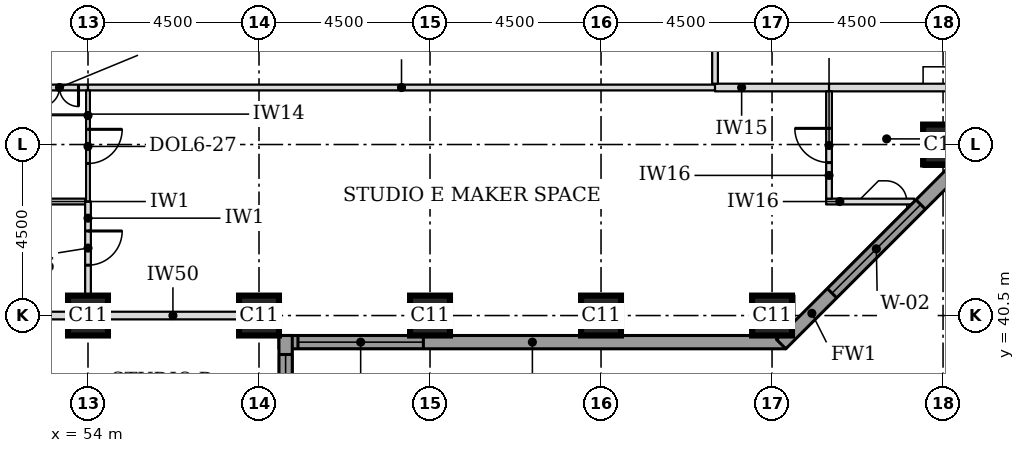
"""IFC4 building model, lengths in metres.
Left out: names, types, materials, properties, quantities, classifications, styles, units other than length and angle.
Written with IfcOpenShell. Run it as: python <this file> out.ifc"""

import sys

from ifc_helpers import new_model, si_unit, direction, frame, frame_2d, origin, origin_2d, place, context, subcontext, project, spatial, rectangle, extrude, element, fill, save


model = new_model("IFC4")
c1 = context("Model", 3, precision=1e-05, world=origin(), true_north=direction((0.0, 1.0)))
c2 = subcontext(c1, "Body", "Model", "MODEL_VIEW")
j1 = project(units=[si_unit("LENGTHUNIT", "METRE"), si_unit("PLANEANGLEUNIT", "RADIAN")], contexts=[c1])
p1 = place(None, origin())
s1 = spatial("IfcSite", under=j1, at=p1, CompositionType="ELEMENT")
p2 = place(p1, origin())
s2 = spatial("IfcBuilding", under=s1, at=p2, CompositionType="ELEMENT")
p3 = place(p2, frame((0.0, 0.0, 115.9)))
s3 = spatial("IfcBuildingStorey", under=s2, at=p3, CompositionType="ELEMENT", Elevation=115.9)
for number, where, z_axis, x_axis in (
    (1, (54.0, 40.5, 0.0), (0.0, 0.0, 1.0), (1.0, 0.0, 0.0)),
    (2, (58.5, 40.5, 0.0), (0.0, 0.0, 1.0), (1.0, 0.0, 0.0)),
    (3, (63.0, 40.5, 0.0), (0.0, 0.0, 1.0), (1.0, 0.0, 0.0)),
    (4, (67.5, 40.5, 0.0), (0.0, 0.0, 1.0), (1.0, 0.0, 0.0)),
    (5, (72.0, 40.5, 0.0), (0.0, 0.0, 1.0), (1.0, 0.0, 0.0)),
    (6, (76.5, 45.0, 0.0), (0.0, 0.0, 1.0), (1.0, 0.0, 0.0)),
):
    element("IfcColumn", number, at=place(p3, frame(where, z_axis=z_axis, x_axis=x_axis)), inside=s3, PredefinedType="COLUMN", context=c2, shape_type="SweptSolid", body=[
        extrude(rectangle(XDim=1.05, YDim=1.05, at=origin_2d()), origin(), (0.0, 0.0, 1.0), 3.7),
    ])
p4 = place(p3, frame((59.025, 39.8, 0.0), z_axis=(0.0, 0.0, 1.0), x_axis=(1.0, 0.0, 0.0)))
e7 = element("IfcWall", 7, at=p4, inside=s3, PredefinedType="STANDARD", context=c2, shape_type="SweptSolid", body=[
    extrude(rectangle(XDim=13.337, YDim=0.35, at=frame_2d((6.669, 0.0))), origin(), (0.0, 0.0, 1.0), 3.525),
])
p5 = place(p4, frame((0.5, 0.0, 0.9)))
e8 = element("IfcOpeningElement", 8, at=p5, cuts=e7, PredefinedType="OPENING", context=c2, shape_type="SweptSolid", body=[
    extrude(rectangle(XDim=3.3, YDim=1.9, at=frame_2d((1.65, 0.95))), frame((0.0, 0.185, 0.0), z_axis=(0.0, -1.0, 0.0), x_axis=(1.0, 0.0, 0.0)), (0.0, 0.0, 1.0), 0.37),
])
p6 = place(p3, frame((72.239, 39.749, 0.0), z_axis=(0.0, 0.0, 1.0), x_axis=(0.707106781187, 0.707106781187, 0.0)))
e9 = element("IfcWall", 9, at=p6, inside=s3, PredefinedType="STANDARD", context=c2, shape_type="SweptSolid", body=[
    extrude(rectangle(XDim=7.089, YDim=0.35, at=frame_2d((3.544, 0.0))), origin(), (0.0, 0.0, 1.0), 3.525),
])
p7 = place(p6, frame((1.894, 0.0, 0.9)))
e10 = element("IfcOpeningElement", 10, at=p7, cuts=e9, PredefinedType="OPENING", context=c2, shape_type="SweptSolid", body=[
    extrude(rectangle(XDim=3.3, YDim=1.9, at=frame_2d((1.65, 0.95))), frame((0.0, 0.185, 0.0), z_axis=(0.0, -1.0, 0.0), x_axis=(1.0, 0.0, 0.0)), (0.0, 0.0, 1.0), 0.37),
])
p8 = place(p3, frame((59.2, 22.138, 0.0), z_axis=(0.0, 0.0, 1.0), x_axis=(0.0, 1.0, 0.0)))
e11 = element("IfcWall", 11, at=p8, inside=s3, PredefinedType="STANDARD", context=c2, shape_type="SweptSolid", body=[
    extrude(rectangle(XDim=17.837, YDim=0.35, at=frame_2d((8.919, 0.0))), origin(), (0.0, 0.0, 1.0), 3.525),
])
p9 = place(p8, frame((5.462, 0.0, 0.9)))
e12 = element("IfcOpeningElement", 12, at=p9, cuts=e11, PredefinedType="OPENING", context=c2, shape_type="SweptSolid", body=[
    extrude(rectangle(XDim=3.3, YDim=1.9, at=frame_2d((1.65, 0.95))), frame((0.0, 0.185, 0.0), z_axis=(0.0, -1.0, 0.0), x_axis=(1.0, 0.0, 0.0)), (0.0, 0.0, 1.0), 0.37),
])
p10 = place(p8, frame((14.037, 0.0, 0.9)))
e13 = element("IfcOpeningElement", 13, at=p10, cuts=e11, PredefinedType="OPENING", context=c2, shape_type="SweptSolid", body=[
    extrude(rectangle(XDim=3.3, YDim=1.9, at=frame_2d((1.65, 0.95))), frame((0.0, 0.185, 0.0), z_axis=(0.0, -1.0, 0.0), x_axis=(1.0, 0.0, 0.0)), (0.0, 0.0, 1.0), 0.37),
])
p11 = place(p3, frame((50.015, 40.5, 0.0), z_axis=(0.0, 0.0, 1.0), x_axis=(1.0, 0.0, 0.0)))
e14 = element("IfcWall", 14, at=p11, inside=s3, PredefinedType="PARTITIONING", context=c2, shape_type="SweptSolid", body=[
    extrude(rectangle(XDim=3.46, YDim=0.2, at=frame_2d((1.73, 0.0))), origin(), (0.0, 0.0, 1.0), 2.8),
])
p12 = place(p3, frame((54.495, 40.5, 0.0), z_axis=(0.0, 0.0, 1.0), x_axis=(1.0, 0.0, 0.0)))
e15 = element("IfcWall", 15, at=p12, inside=s3, PredefinedType="PARTITIONING", context=c2, shape_type="SweptSolid", body=[
    extrude(rectangle(XDim=3.48, YDim=0.2, at=frame_2d((1.74, 0.0))), origin(), (0.0, 0.0, 1.0), 2.8),
])
p13 = place(p3, frame((52.5, 43.5, 0.0), z_axis=(0.0, 0.0, 1.0), x_axis=(1.0, 0.0, 0.0)))
e16 = element("IfcWall", 16, at=p13, inside=s3, PredefinedType="PARTITIONING", context=c2, shape_type="SweptSolid", body=[
    extrude(rectangle(XDim=1.425, YDim=0.15, at=frame_2d((0.712, 0.0))), origin(), (0.0, 0.0, 1.0), 3.55),
])
p14 = place(p3, frame((73.425, 43.5, 0.0), z_axis=(0.0, 0.0, 1.0), x_axis=(1.0, 0.0, 0.0)))
e17 = element("IfcWall", 17, at=p14, inside=s3, PredefinedType="PARTITIONING", context=c2, shape_type="SweptSolid", body=[
    extrude(rectangle(XDim=2.317, YDim=0.15, at=frame_2d((1.159, 0.0))), origin(), (0.0, 0.0, 1.0), 3.55),
])
p15 = place(p3, frame((52.5, 46.5, 0.0), z_axis=(0.0, 0.0, 1.0), x_axis=(1.0, 0.0, 0.0)))
e18 = element("IfcWall", 18, at=p15, inside=s3, PredefinedType="PARTITIONING", context=c2, shape_type="SweptSolid", body=[
    extrude(rectangle(XDim=1.5, YDim=0.15, at=frame_2d((0.75, 0.0))), origin(), (0.0, 0.0, 1.0), 3.55),
])
p16 = place(p15, frame((0.25, 0.0, 0.0)))
e19 = element("IfcOpeningElement", 19, at=p16, cuts=e18, PredefinedType="OPENING", context=c2, shape_type="SweptSolid", body=[
    extrude(rectangle(XDim=1.0, YDim=2.1, at=frame_2d((0.5, 1.05))), frame((0.0, 0.085, 0.0), z_axis=(0.0, -1.0, 0.0), x_axis=(1.0, 0.0, 0.0)), (0.0, 0.0, 1.0), 0.17),
])
p17 = place(p3, frame((54.0, 46.5, 0.0), z_axis=(0.0, 0.0, 1.0), x_axis=(1.0, 0.0, 0.0)))
e20 = element("IfcWall", 20, at=p17, inside=s3, PredefinedType="PARTITIONING", context=c2, shape_type="SweptSolid", body=[
    extrude(rectangle(XDim=16.5, YDim=0.15, at=frame_2d((8.25, 0.0))), origin(), (0.0, 0.0, 1.0), 3.55),
])
p18 = place(p3, frame((70.5, 46.5, 0.0), z_axis=(0.0, 0.0, 1.0), x_axis=(1.0, 0.0, 0.0)))
e21 = element("IfcWall", 21, at=p18, inside=s3, PredefinedType="PARTITIONING", context=c2, shape_type="SweptSolid", body=[
    extrude(rectangle(XDim=3.0, YDim=0.2, at=frame_2d((1.5, 0.0))), origin(), (0.0, 0.0, 1.0), 3.55),
])
p19 = place(p3, frame((73.5, 46.5, 0.0), z_axis=(0.0, 0.0, 1.0), x_axis=(1.0, 0.0, 0.0)))
e22 = element("IfcWall", 22, at=p19, inside=s3, PredefinedType="PARTITIONING", context=c2, shape_type="SweptSolid", body=[
    extrude(rectangle(XDim=3.525, YDim=0.2, at=frame_2d((1.762, 0.0))), origin(), (0.0, 0.0, 1.0), 3.55),
])
p20 = place(p3, frame((54.0, 41.025, 0.0), z_axis=(0.0, 0.0, 1.0), x_axis=(0.0, 1.0, 0.0)))
e23 = element("IfcWall", 23, at=p20, inside=s3, PredefinedType="PARTITIONING", context=c2, shape_type="SweptSolid", body=[
    extrude(rectangle(XDim=2.475, YDim=0.15, at=frame_2d((1.238, 0.0))), origin(), (0.0, 0.0, 1.0), 3.55),
])
p21 = place(p20, frame((0.8, 0.0, 0.0)))
e24 = element("IfcOpeningElement", 24, at=p21, cuts=e23, PredefinedType="OPENING", context=c2, shape_type="SweptSolid", body=[
    extrude(rectangle(XDim=0.9, YDim=2.1, at=frame_2d((0.45, 1.05))), frame((0.0, 0.085, 0.0), z_axis=(0.0, -1.0, 0.0), x_axis=(1.0, 0.0, 0.0)), (0.0, 0.0, 1.0), 0.17),
])
p22 = place(p3, frame((54.0, 43.5, 0.0), z_axis=(0.0, 0.0, 1.0), x_axis=(0.0, 1.0, 0.0)))
e25 = element("IfcWall", 25, at=p22, inside=s3, PredefinedType="PARTITIONING", context=c2, shape_type="SweptSolid", body=[
    extrude(rectangle(XDim=2.925, YDim=0.1, at=frame_2d((1.462, 0.0))), origin(), (0.0, 0.0, 1.0), 3.55),
])
p23 = place(p22, frame((1.0, 0.0, 0.0)))
e26 = element("IfcOpeningElement", 26, at=p23, cuts=e25, PredefinedType="OPENING", context=c2, shape_type="SweptSolid", body=[
    extrude(rectangle(XDim=0.9, YDim=2.1, at=frame_2d((0.45, 1.05))), frame((0.0, 0.06, 0.0), z_axis=(0.0, -1.0, 0.0), x_axis=(1.0, 0.0, 0.0)), (0.0, 0.0, 1.0), 0.12),
])
p24 = place(p3, frame((73.5, 43.575, 0.0), z_axis=(0.0, 0.0, 1.0), x_axis=(0.0, 1.0, 0.0)))
e27 = element("IfcWall", 27, at=p24, inside=s3, PredefinedType="PARTITIONING", context=c2, shape_type="SweptSolid", body=[
    extrude(rectangle(XDim=2.825, YDim=0.15, at=frame_2d((1.413, 0.0))), origin(), (0.0, 0.0, 1.0), 3.55),
])
p25 = place(p24, frame((0.95, 0.0, 0.0)))
e28 = element("IfcOpeningElement", 28, at=p25, cuts=e27, PredefinedType="OPENING", context=c2, shape_type="SweptSolid", body=[
    extrude(rectangle(XDim=0.9, YDim=2.1, at=frame_2d((0.45, 1.05))), frame((0.0, 0.085, 0.0), z_axis=(0.0, -1.0, 0.0), x_axis=(1.0, 0.0, 0.0)), (0.0, 0.0, 1.0), 0.17),
])
p26 = place(p3, frame((70.5, 46.6, 0.0), z_axis=(0.0, 0.0, 1.0), x_axis=(0.0, 1.0, 0.0)))
e29 = element("IfcWall", 29, at=p26, inside=s3, PredefinedType="PARTITIONING", context=c2, shape_type="SweptSolid", body=[
    extrude(rectangle(XDim=13.4, YDim=0.15, at=frame_2d((6.7, 0.0))), origin(), (0.0, 0.0, 1.0), 3.55),
])
p27 = place(p26, frame((6.2, 0.0, 0.0)))
e30 = element("IfcOpeningElement", 30, at=p27, cuts=e29, PredefinedType="OPENING", context=c2, shape_type="SweptSolid", body=[
    extrude(rectangle(XDim=1.0, YDim=2.1, at=frame_2d((0.5, 1.05))), frame((0.0, 0.085, 0.0), z_axis=(0.0, -1.0, 0.0), x_axis=(1.0, 0.0, 0.0)), (0.0, 0.0, 1.0), 0.17),
])
p28 = place(p5, origin())
e31 = element("IfcWindow", 31, at=p28, inside=s3, PartitioningType="SINGLE_PANEL", PredefinedType="WINDOW", context=c2, shape_type="SweptSolid", body=[
    extrude(rectangle(XDim=3.3, YDim=1.9, at=frame_2d((1.65, 0.95))), frame((0.0, 0.085, 0.0), z_axis=(0.0, -1.0, 0.0), x_axis=(1.0, 0.0, 0.0)), (0.0, 0.0, 1.0), 0.06),
])
fill(e8, e31)
p29 = place(p7, origin())
e32 = element("IfcWindow", 32, at=p29, inside=s3, PartitioningType="SINGLE_PANEL", PredefinedType="WINDOW", context=c2, shape_type="SweptSolid", body=[
    extrude(rectangle(XDim=3.3, YDim=1.9, at=frame_2d((1.65, 0.95))), frame((0.0, 0.085, 0.0), z_axis=(0.0, -1.0, 0.0), x_axis=(1.0, 0.0, 0.0)), (0.0, 0.0, 1.0), 0.06),
])
fill(e10, e32)
p30 = place(p10, origin())
e33 = element("IfcWindow", 33, at=p30, inside=s3, PartitioningType="SINGLE_PANEL", PredefinedType="WINDOW", context=c2, shape_type="SweptSolid", body=[
    extrude(rectangle(XDim=3.3, YDim=1.9, at=frame_2d((1.65, 0.95))), frame((0.0, 0.085, 0.0), z_axis=(0.0, -1.0, 0.0), x_axis=(1.0, 0.0, 0.0)), (0.0, 0.0, 1.0), 0.06),
])
fill(e13, e33)
p31 = place(p16, frame((1.0, 0.0, 0.0), z_axis=(0.0, 0.0, 1.0), x_axis=(-1.0, 0.0, 0.0)))
e34 = element("IfcDoor", 34, at=p31, inside=s3, OperationType="DOUBLE_DOOR_SINGLE_SWING", PredefinedType="DOOR", context=c2, shape_type="SweptSolid", body=[
    extrude(rectangle(XDim=1.0, YDim=2.1, at=frame_2d((0.5, 1.05))), frame((0.0, 0.025, 0.0), z_axis=(0.0, -1.0, 0.0), x_axis=(1.0, 0.0, 0.0)), (0.0, 0.0, 1.0), 0.05),
])
fill(e19, e34)
p32 = place(p23, frame((0.9, 0.0, 0.0), z_axis=(0.0, 0.0, 1.0), x_axis=(-1.0, 0.0, 0.0)))
e35 = element("IfcDoor", 35, at=p32, inside=s3, OperationType="SINGLE_SWING_LEFT", PredefinedType="DOOR", context=c2, shape_type="SweptSolid", body=[
    extrude(rectangle(XDim=0.9, YDim=2.1, at=frame_2d((0.45, 1.05))), frame((0.0, 0.025, 0.0), z_axis=(0.0, -1.0, 0.0), x_axis=(1.0, 0.0, 0.0)), (0.0, 0.0, 1.0), 0.05),
])
fill(e26, e35)
p33 = place(p25, origin())
e36 = element("IfcDoor", 36, at=p33, inside=s3, OperationType="SINGLE_SWING_RIGHT", PredefinedType="DOOR", context=c2, shape_type="SweptSolid", body=[
    extrude(rectangle(XDim=0.9, YDim=2.1, at=frame_2d((0.45, 1.05))), frame((0.0, 0.025, 0.0), z_axis=(0.0, -1.0, 0.0), x_axis=(1.0, 0.0, 0.0)), (0.0, 0.0, 1.0), 0.05),
])
fill(e28, e36)
p34 = place(p21, frame((0.9, 0.0, 0.0), z_axis=(0.0, 0.0, 1.0), x_axis=(-1.0, 0.0, 0.0)))
e37 = element("IfcDoor", 37, at=p34, inside=s3, OperationType="SINGLE_SWING_LEFT", PredefinedType="DOOR", context=c2, shape_type="SweptSolid", body=[
    extrude(rectangle(XDim=0.9, YDim=2.1, at=frame_2d((0.45, 1.05))), frame((0.0, 0.025, 0.0), z_axis=(0.0, -1.0, 0.0), x_axis=(1.0, 0.0, 0.0)), (0.0, 0.0, 1.0), 0.05),
])
fill(e24, e37)
save(model, sys.argv[1])
